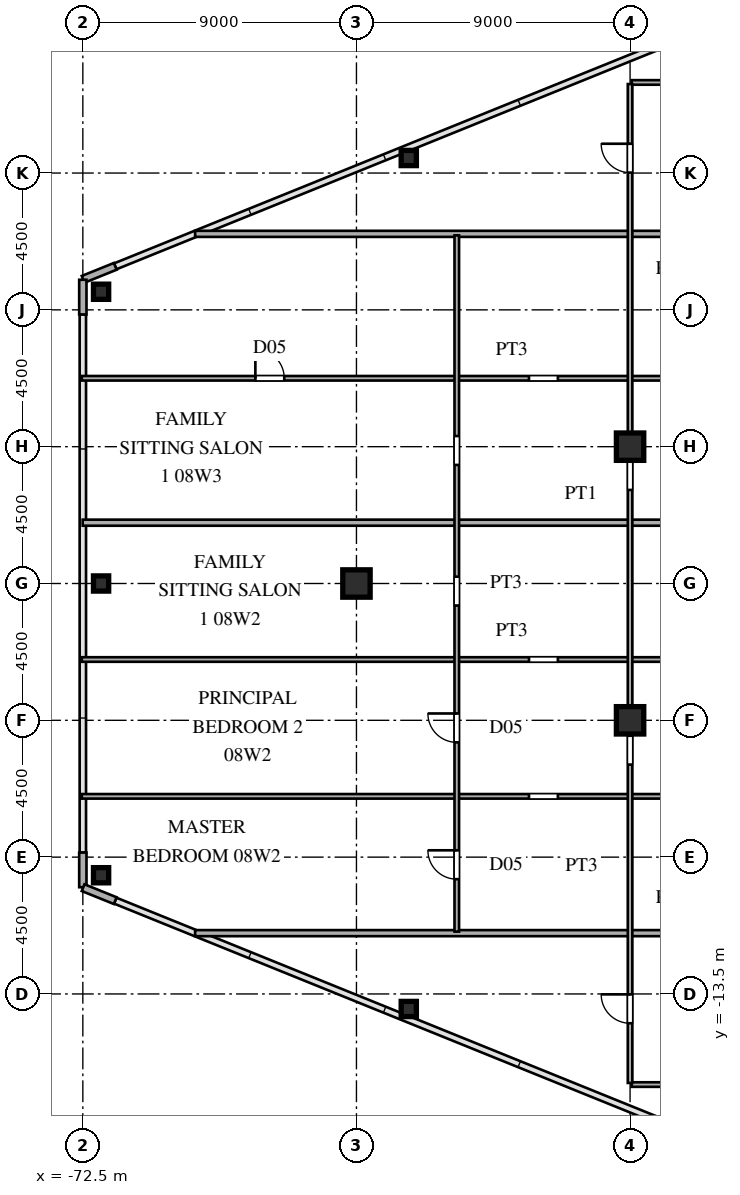
"""IFC4 building model, lengths in metres.
Left out: names, types, materials, properties, quantities, classifications, styles, units other than length and angle.
Written with IfcOpenShell. Run it as: python <this file> out.ifc"""

import sys

from ifc_helpers import new_model, si_unit, direction, frame, frame_2d, origin, origin_2d, place, context, subcontext, project, spatial, rectangle, hollow_rectangle, i_section, extrude, source, transform, mapped, element, fill, save


model = new_model("IFC4")
c1 = context("Model", 3, precision=1e-05, world=origin(), true_north=direction((0.0, 1.0)))
c2 = subcontext(c1, "Body", "Model", "MODEL_VIEW")
j1 = project(units=[si_unit("LENGTHUNIT", "METRE"), si_unit("PLANEANGLEUNIT", "RADIAN")], contexts=[c1])
p1 = place(None, origin())
s1 = spatial("IfcSite", under=j1, at=p1, CompositionType="ELEMENT")
p2 = place(p1, origin())
s2 = spatial("IfcBuilding", under=s1, at=p2, CompositionType="ELEMENT")
p3 = place(p2, frame((0.0, 0.0, 33.3)))
s3 = spatial("IfcBuildingStorey", under=s2, at=p3, CompositionType="ELEMENT", Elevation=33.3)
m1 = source(origin(), c2, "Body", "SweptSolid", [
    extrude(i_section(OverallWidth=0.9, OverallDepth=0.9, WebThickness=0.036, FlangeThickness=0.055, at=origin_2d()), origin(), (0.0, 0.0, 1.0), 3.6),
])
for number, where, z_axis, x_axis in (
    (1, (-54.5, -4.5, 0.0), (0.0, 0.0, 1.0), (1.0, 0.0, 0.0)),
    (2, (-54.5, 4.5, 0.0), (0.0, 0.0, 1.0), (1.0, 0.0, 0.0)),
    (3, (-63.5, 0.0, 0.0), (0.0, 0.0, 1.0), (1.0, 0.0, 0.0)),
):
    element("IfcColumn", number, at=place(p3, frame(where, z_axis=z_axis, x_axis=x_axis)), inside=s3, PredefinedType="COLUMN", context=c2, shape_type="MappedRepresentation", body=[
        mapped(m1, transform((0.0, 0.0, 0.0), scale=1.0)),
    ])
m2 = source(origin(), c2, "Body", "SweptSolid", [
    extrude(hollow_rectangle(XDim=0.5, YDim=0.5, WallThickness=0.02, at=origin_2d()), origin(), (0.0, 0.0, 1.0), 3.6),
])
for number, where, z_axis, x_axis in (
    (4, (-71.9, 9.596, 0.0), (0.0, 0.0, 1.0), (1.0, 0.0, 0.0)),
    (5, (-71.9, -9.596, 0.0), (0.0, 0.0, 1.0), (1.0, 0.0, 0.0)),
    (6, (-61.779, -13.994, 0.0), (0.0, 0.0, 1.0), (1.0, 0.0, 0.0)),
    (7, (-61.779, 13.994, 0.0), (0.0, 0.0, 1.0), (1.0, 0.0, 0.0)),
    (8, (-71.9, 0.0, 0.0), (0.0, 0.0, 1.0), (1.0, 0.0, 0.0)),
):
    element("IfcColumn", number, at=place(p3, frame(where, z_axis=z_axis, x_axis=x_axis)), inside=s3, PredefinedType="COLUMN", context=c2, shape_type="MappedRepresentation", body=[
        mapped(m2, transform((0.0, 0.0, 0.0), scale=1.0)),
    ])
for number, where, z_axis, x_axis in (
    (9, (-71.434, 10.431, 0.0), (0.0, 0.0, 1.0), (-0.927, -0.375, 0.0)),
    (10, (-72.5, 9.99, 0.0), (0.0, 0.0, 1.0), (0.0, -1.0, 0.0)),
    (11, (-72.5, -8.85, 0.0), (0.0, 0.0, 1.0), (0.0, -1.0, 0.0)),
    (12, (-72.491, -10.004, 0.0), (0.0, 0.0, 1.0), (0.927, -0.375, 0.0)),
):
    element("IfcWall", number, at=place(p3, frame(where, z_axis=z_axis, x_axis=x_axis)), inside=s3, PredefinedType="SOLIDWALL", context=c2, shape_type="SweptSolid", body=[
        extrude(rectangle(XDim=1.14, YDim=0.24, at=frame_2d((0.57, 0.0))), origin(), (0.0, 0.0, 1.0), 3.38),
    ])
p4 = place(p3, frame((-54.45, -16.48, 0.0), z_axis=(0.0, 0.0, 1.0), x_axis=(1.0, 0.0, 0.0)))
e13 = element("IfcWall", 13, at=p4, inside=s3, PredefinedType="PARTITIONING", context=c2, shape_type="SweptSolid", body=[
    extrude(rectangle(XDim=10.2, YDim=0.15, at=frame_2d((5.1, 0.0))), origin(), (0.0, 0.0, 1.0), 3.38),
])
p5 = place(p4, frame((4.625, 0.0, 0.0)))
e14 = element("IfcOpeningElement", 14, at=p5, cuts=e13, PredefinedType="OPENING", context=c2, shape_type="SweptSolid", body=[
    extrude(rectangle(XDim=0.95, YDim=2.15, at=frame_2d((0.475, 1.075))), frame((0.0, 0.085, 0.0), z_axis=(0.0, -1.0, 0.0), x_axis=(1.0, 0.0, 0.0)), (0.0, 0.0, 1.0), 0.17),
])
p6 = place(p3, frame((-68.807, -11.5, 0.0), z_axis=(0.0, 0.0, 1.0), x_axis=(1.0, 0.0, 0.0)))
e15 = element("IfcWall", 15, at=p6, inside=s3, PredefinedType="PARTITIONING", context=c2, shape_type="SweptSolid", body=[
    extrude(rectangle(XDim=29.077, YDim=0.2, at=frame_2d((14.539, 0.0))), origin(), (0.0, 0.0, 1.0), 3.38),
])
p7 = place(p3, frame((-72.535, -7.0, 0.0), z_axis=(0.0, 0.0, 1.0), x_axis=(1.0, 0.0, 0.0)))
e16 = element("IfcWall", 16, at=p7, inside=s3, PredefinedType="PARTITIONING", context=c2, shape_type="SweptSolid", body=[
    extrude(rectangle(XDim=28.285, YDim=0.15, at=frame_2d((14.143, 0.0))), origin(), (0.0, 0.0, 1.0), 3.38),
])
p8 = place(p7, frame((22.71, 0.0, 0.0)))
e17 = element("IfcOpeningElement", 17, at=p8, cuts=e16, PredefinedType="OPENING", context=c2, shape_type="SweptSolid", body=[
    extrude(rectangle(XDim=0.95, YDim=2.15, at=frame_2d((0.475, 1.075))), frame((0.0, 0.085, 0.0), z_axis=(0.0, -1.0, 0.0), x_axis=(1.0, 0.0, 0.0)), (0.0, 0.0, 1.0), 0.17),
])
p9 = place(p7, frame((14.71, 0.0, 0.0)))
e18 = element("IfcOpeningElement", 18, at=p9, cuts=e16, PredefinedType="OPENING", context=c2, shape_type="SweptSolid", body=[
    extrude(rectangle(XDim=0.95, YDim=2.15, at=frame_2d((0.475, 1.075))), frame((0.0, 0.085, 0.0), z_axis=(0.0, -1.0, 0.0), x_axis=(1.0, 0.0, 0.0)), (0.0, 0.0, 1.0), 0.17),
])
p10 = place(p3, frame((-72.535, -2.5, 0.0), z_axis=(0.0, 0.0, 1.0), x_axis=(1.0, 0.0, 0.0)))
e19 = element("IfcWall", 19, at=p10, inside=s3, PredefinedType="PARTITIONING", context=c2, shape_type="SweptSolid", body=[
    extrude(rectangle(XDim=28.285, YDim=0.15, at=frame_2d((14.143, 0.0))), origin(), (0.0, 0.0, 1.0), 3.38),
])
p11 = place(p10, frame((22.71, 0.0, 0.0)))
e20 = element("IfcOpeningElement", 20, at=p11, cuts=e19, PredefinedType="OPENING", context=c2, shape_type="SweptSolid", body=[
    extrude(rectangle(XDim=0.95, YDim=2.15, at=frame_2d((0.475, 1.075))), frame((0.0, 0.085, 0.0), z_axis=(0.0, -1.0, 0.0), x_axis=(1.0, 0.0, 0.0)), (0.0, 0.0, 1.0), 0.17),
])
p12 = place(p10, frame((14.71, 0.0, 0.0)))
e21 = element("IfcOpeningElement", 21, at=p12, cuts=e19, PredefinedType="OPENING", context=c2, shape_type="SweptSolid", body=[
    extrude(rectangle(XDim=0.95, YDim=2.15, at=frame_2d((0.475, 1.075))), frame((0.0, 0.085, 0.0), z_axis=(0.0, -1.0, 0.0), x_axis=(1.0, 0.0, 0.0)), (0.0, 0.0, 1.0), 0.17),
])
p13 = place(p3, frame((-72.505, 2.0, 0.0), z_axis=(0.0, 0.0, 1.0), x_axis=(1.0, 0.0, 0.0)))
e22 = element("IfcWall", 22, at=p13, inside=s3, PredefinedType="PARTITIONING", context=c2, shape_type="SweptSolid", body=[
    extrude(rectangle(XDim=32.775, YDim=0.2, at=frame_2d((16.387, 0.0))), origin(), (0.0, 0.0, 1.0), 3.38),
])
p14 = place(p3, frame((-72.535, 6.75, 0.0), z_axis=(0.0, 0.0, 1.0), x_axis=(1.0, 0.0, 0.0)))
e23 = element("IfcWall", 23, at=p14, inside=s3, PredefinedType="PARTITIONING", context=c2, shape_type="SweptSolid", body=[
    extrude(rectangle(XDim=28.285, YDim=0.15, at=frame_2d((14.143, 0.0))), origin(), (0.0, 0.0, 1.0), 3.38),
])
p15 = place(p14, frame((5.71, 0.0, 0.0)))
e24 = element("IfcOpeningElement", 24, at=p15, cuts=e23, PredefinedType="OPENING", context=c2, shape_type="SweptSolid", body=[
    extrude(rectangle(XDim=0.95, YDim=2.15, at=frame_2d((0.475, 1.075))), frame((0.0, 0.085, 0.0), z_axis=(0.0, -1.0, 0.0), x_axis=(1.0, 0.0, 0.0)), (0.0, 0.0, 1.0), 0.17),
])
p16 = place(p14, frame((14.71, 0.0, 0.0)))
e25 = element("IfcOpeningElement", 25, at=p16, cuts=e23, PredefinedType="OPENING", context=c2, shape_type="SweptSolid", body=[
    extrude(rectangle(XDim=0.95, YDim=2.15, at=frame_2d((0.475, 1.075))), frame((0.0, 0.085, 0.0), z_axis=(0.0, -1.0, 0.0), x_axis=(1.0, 0.0, 0.0)), (0.0, 0.0, 1.0), 0.17),
])
p17 = place(p3, frame((-68.807, 11.5, 0.0), z_axis=(0.0, 0.0, 1.0), x_axis=(1.0, 0.0, 0.0)))
e26 = element("IfcWall", 26, at=p17, inside=s3, PredefinedType="PARTITIONING", context=c2, shape_type="SweptSolid", body=[
    extrude(rectangle(XDim=29.077, YDim=0.2, at=frame_2d((14.539, 0.0))), origin(), (0.0, 0.0, 1.0), 3.38),
])
p18 = place(p3, frame((-54.45, 16.48, 0.0), z_axis=(0.0, 0.0, 1.0), x_axis=(1.0, 0.0, 0.0)))
e27 = element("IfcWall", 27, at=p18, inside=s3, PredefinedType="PARTITIONING", context=c2, shape_type="SweptSolid", body=[
    extrude(rectangle(XDim=10.2, YDim=0.15, at=frame_2d((5.1, 0.0))), origin(), (0.0, 0.0, 1.0), 3.38),
])
p19 = place(p18, frame((4.625, 0.0, 0.0)))
e28 = element("IfcOpeningElement", 28, at=p19, cuts=e27, PredefinedType="OPENING", context=c2, shape_type="SweptSolid", body=[
    extrude(rectangle(XDim=0.95, YDim=2.15, at=frame_2d((0.475, 1.075))), frame((0.0, 0.085, 0.0), z_axis=(0.0, -1.0, 0.0), x_axis=(1.0, 0.0, 0.0)), (0.0, 0.0, 1.0), 0.17),
])
p20 = place(p3, frame((-60.2, -11.45, 0.0), z_axis=(0.0, 0.0, 1.0), x_axis=(0.0, 1.0, 0.0)))
e29 = element("IfcWall", 29, at=p20, inside=s3, PredefinedType="PARTITIONING", context=c2, shape_type="SweptSolid", body=[
    extrude(rectangle(XDim=22.9, YDim=0.15, at=frame_2d((11.45, 0.0))), origin(), (0.0, 0.0, 1.0), 3.38),
])
p21 = place(p20, frame((1.725, 0.0, 0.0)))
e30 = element("IfcOpeningElement", 30, at=p21, cuts=e29, PredefinedType="OPENING", context=c2, shape_type="SweptSolid", body=[
    extrude(rectangle(XDim=0.95, YDim=2.15, at=frame_2d((0.475, 1.075))), frame((0.0, 0.085, 0.0), z_axis=(0.0, -1.0, 0.0), x_axis=(1.0, 0.0, 0.0)), (0.0, 0.0, 1.0), 0.17),
])
p22 = place(p20, frame((6.225, 0.0, 0.0)))
e31 = element("IfcOpeningElement", 31, at=p22, cuts=e29, PredefinedType="OPENING", context=c2, shape_type="SweptSolid", body=[
    extrude(rectangle(XDim=0.95, YDim=2.15, at=frame_2d((0.475, 1.075))), frame((0.0, 0.085, 0.0), z_axis=(0.0, -1.0, 0.0), x_axis=(1.0, 0.0, 0.0)), (0.0, 0.0, 1.0), 0.17),
])
p23 = place(p20, frame((10.725, 0.0, 0.0)))
e32 = element("IfcOpeningElement", 32, at=p23, cuts=e29, PredefinedType="OPENING", context=c2, shape_type="SweptSolid", body=[
    extrude(rectangle(XDim=0.95, YDim=2.15, at=frame_2d((0.475, 1.075))), frame((0.0, 0.085, 0.0), z_axis=(0.0, -1.0, 0.0), x_axis=(1.0, 0.0, 0.0)), (0.0, 0.0, 1.0), 0.17),
])
p24 = place(p20, frame((15.35, 0.0, 0.0)))
e33 = element("IfcOpeningElement", 33, at=p24, cuts=e29, PredefinedType="OPENING", context=c2, shape_type="SweptSolid", body=[
    extrude(rectangle(XDim=0.95, YDim=2.15, at=frame_2d((0.475, 1.075))), frame((0.0, 0.085, 0.0), z_axis=(0.0, -1.0, 0.0), x_axis=(1.0, 0.0, 0.0)), (0.0, 0.0, 1.0), 0.17),
])
p25 = place(p3, frame((-54.5, -16.427, 0.0), z_axis=(0.0, 0.0, 1.0), x_axis=(0.0, 1.0, 0.0)))
e34 = element("IfcWall", 34, at=p25, inside=s3, PredefinedType="PARTITIONING", context=c2, shape_type="SweptSolid", body=[
    extrude(rectangle(XDim=32.854, YDim=0.15, at=frame_2d((16.427, 0.0))), origin(), (0.0, 0.0, 1.0), 2.68),
])
p26 = place(p25, frame((1.963, 0.0, 0.0)))
e35 = element("IfcOpeningElement", 35, at=p26, cuts=e34, PredefinedType="OPENING", context=c2, shape_type="SweptSolid", body=[
    extrude(rectangle(XDim=0.95, YDim=2.15, at=frame_2d((0.475, 1.075))), frame((0.0, 0.085, 0.0), z_axis=(0.0, -1.0, 0.0), x_axis=(1.0, 0.0, 0.0)), (0.0, 0.0, 1.0), 0.17),
])
p27 = place(p25, frame((10.47, 0.0, 0.0)))
e36 = element("IfcOpeningElement", 36, at=p27, cuts=e34, PredefinedType="OPENING", context=c2, shape_type="SweptSolid", body=[
    extrude(rectangle(XDim=0.95, YDim=2.15, at=frame_2d((0.475, 1.075))), frame((0.0, 0.085, 0.0), z_axis=(0.0, -1.0, 0.0), x_axis=(1.0, 0.0, 0.0)), (0.0, 0.0, 1.0), 0.17),
])
p28 = place(p25, frame((19.504, 0.0, 0.0)))
e37 = element("IfcOpeningElement", 37, at=p28, cuts=e34, PredefinedType="OPENING", context=c2, shape_type="SweptSolid", body=[
    extrude(rectangle(XDim=0.95, YDim=2.15, at=frame_2d((0.475, 1.075))), frame((0.0, 0.085, 0.0), z_axis=(0.0, -1.0, 0.0), x_axis=(1.0, 0.0, 0.0)), (0.0, 0.0, 1.0), 0.17),
])
p29 = place(p25, frame((29.941, 0.0, 0.0)))
e38 = element("IfcOpeningElement", 38, at=p29, cuts=e34, PredefinedType="OPENING", context=c2, shape_type="SweptSolid", body=[
    extrude(rectangle(XDim=0.95, YDim=2.15, at=frame_2d((0.475, 1.075))), frame((0.0, 0.085, 0.0), z_axis=(0.0, -1.0, 0.0), x_axis=(1.0, 0.0, 0.0)), (0.0, 0.0, 1.0), 0.17),
])
m3 = source(origin(), c2, "Body", "SweptSolid", [
    extrude(rectangle(XDim=0.95, YDim=2.15, at=frame_2d((0.475, 1.075))), frame((0.0, 0.025, 0.0), z_axis=(0.0, -1.0, 0.0), x_axis=(1.0, 0.0, 0.0)), (0.0, 0.0, 1.0), 0.05),
])
p30 = place(p15, origin())
e39 = element("IfcDoor", 39, at=p30, inside=s3, OperationType="SINGLE_SWING_LEFT", PredefinedType="DOOR", context=c2, shape_type="MappedRepresentation", body=[
    mapped(m3, transform((0.0, 0.0, 0.0), scale=1.0)),
])
fill(e24, e39)
p31 = place(p21, origin())
e40 = element("IfcDoor", 40, at=p31, inside=s3, OperationType="SINGLE_SWING_RIGHT", PredefinedType="DOOR", context=c2, shape_type="MappedRepresentation", body=[
    mapped(m3, transform((0.0, 0.0, 0.0), scale=1.0)),
])
fill(e30, e40)
p32 = place(p22, origin())
e41 = element("IfcDoor", 41, at=p32, inside=s3, OperationType="SINGLE_SWING_RIGHT", PredefinedType="DOOR", context=c2, shape_type="MappedRepresentation", body=[
    mapped(m3, transform((0.0, 0.0, 0.0), scale=1.0)),
])
fill(e31, e41)
p33 = place(p26, origin())
e42 = element("IfcDoor", 42, at=p33, inside=s3, OperationType="SINGLE_SWING_RIGHT", PredefinedType="DOOR", context=c2, shape_type="MappedRepresentation", body=[
    mapped(m3, transform((0.0, 0.0, 0.0), scale=1.0)),
])
fill(e35, e42)
p34 = place(p29, origin())
e43 = element("IfcDoor", 43, at=p34, inside=s3, OperationType="SINGLE_SWING_RIGHT", PredefinedType="DOOR", context=c2, shape_type="MappedRepresentation", body=[
    mapped(m3, transform((0.0, 0.0, 0.0), scale=1.0)),
])
fill(e38, e43)
save(model, sys.argv[1])
